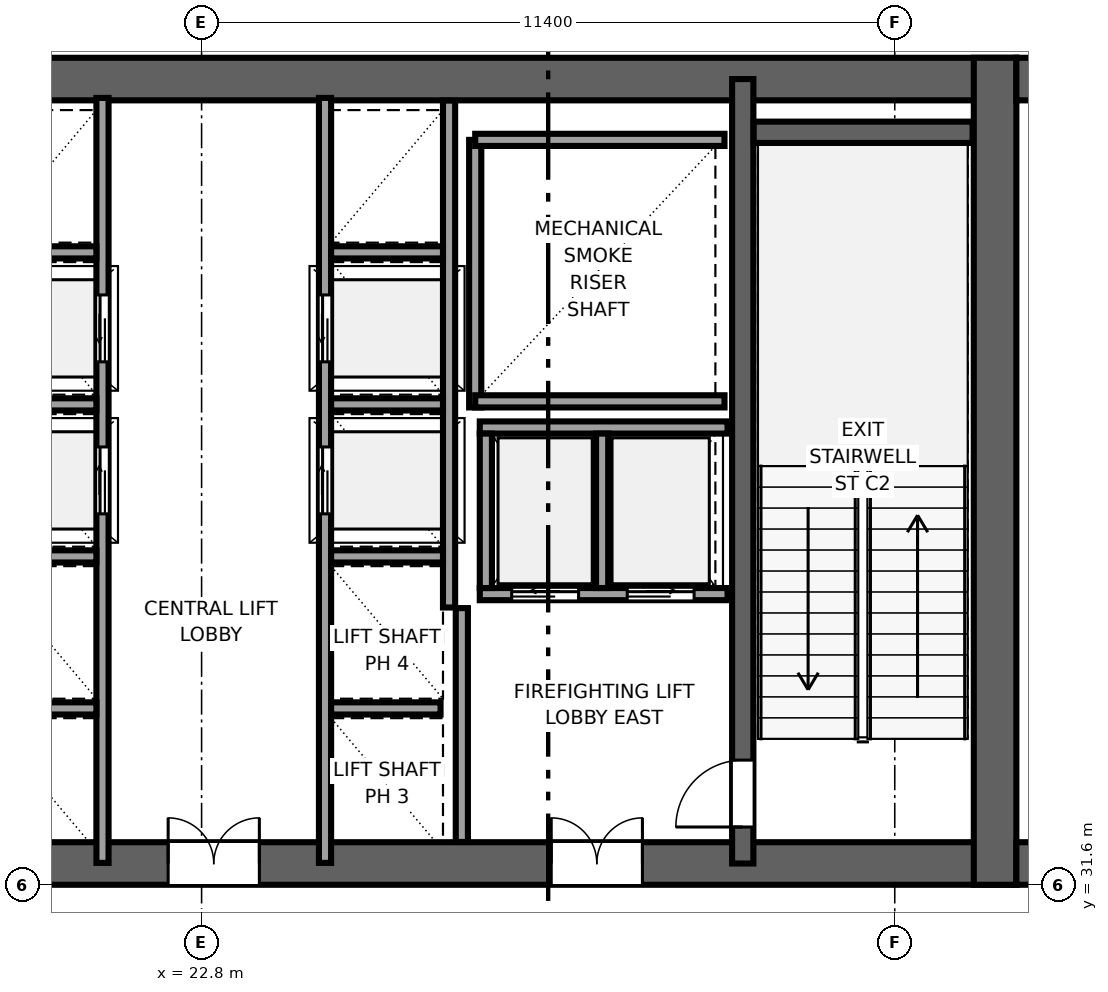
"""IFC4 building model, lengths in metres.
Left out: names, types, materials, properties, quantities, classifications, styles, units other than length and angle.
Written with IfcOpenShell. Run it as: python <this file> out.ifc"""

import sys

from ifc_helpers import new_model, si_unit, direction, frame, frame_2d, origin, place, context, subcontext, project, spatial, rectangle, extrude, source, transform, mapped, element, fill, save


model = new_model("IFC4")
c1 = context("Model", 3, precision=1e-05, world=origin(), true_north=direction((0.0, 1.0)))
c2 = subcontext(c1, "Body", "Model", "MODEL_VIEW")
j1 = project(units=[si_unit("LENGTHUNIT", "METRE"), si_unit("PLANEANGLEUNIT", "RADIAN")], contexts=[c1])
p1 = place(None, origin())
s1 = spatial("IfcSite", under=j1, at=p1, CompositionType="ELEMENT")
p2 = place(p1, origin())
s2 = spatial("IfcBuilding", under=s1, at=p2, CompositionType="ELEMENT")
p3 = place(p2, frame((0.0, 0.0, 182.55)))
s3 = spatial("IfcBuildingStorey", under=s2, at=p3, CompositionType="ELEMENT", Elevation=182.55)
p4 = place(p3, frame((9.8, 31.95, 0.0), z_axis=(0.0, 0.0, 1.0), x_axis=(1.0, 0.0, 0.0)))
e1 = element("IfcWall", 1, at=p4, inside=s3, PredefinedType="SHEAR", context=c2, shape_type="SweptSolid", body=[
    extrude(rectangle(XDim=26.4, YDim=0.7, at=frame_2d((13.2, 0.0))), origin(), (0.0, 0.0, 1.0), 5.0),
])
p5 = place(p4, frame((7.65, 0.0, 0.0), z_axis=(0.0, 0.0, 1.0), x_axis=(-1.0, 0.0, 0.0)))
e2 = element("IfcOpeningElement", 2, at=p5, cuts=e1, PredefinedType="OPENING", context=c2, shape_type="SweptSolid", body=[
    extrude(rectangle(XDim=1.5, YDim=2.04, at=frame_2d((0.75, 1.02))), frame((0.0, 0.36, 0.0), z_axis=(0.0, -1.0, 0.0), x_axis=(1.0, 0.0, 0.0)), (0.0, 0.0, 1.0), 0.72),
])
p6 = place(p4, frame((13.95, 0.0, 0.0), z_axis=(0.0, 0.0, 1.0), x_axis=(-1.0, 0.0, 0.0)))
e3 = element("IfcOpeningElement", 3, at=p6, cuts=e1, PredefinedType="OPENING", context=c2, shape_type="SweptSolid", body=[
    extrude(rectangle(XDim=1.5, YDim=2.04, at=frame_2d((0.75, 1.02))), frame((0.0, 0.36, 0.0), z_axis=(0.0, -1.0, 0.0), x_axis=(1.0, 0.0, 0.0)), (0.0, 0.0, 1.0), 0.72),
])
p7 = place(p4, frame((20.25, 0.0, 0.0), z_axis=(0.0, 0.0, 1.0), x_axis=(-1.0, 0.0, 0.0)))
e4 = element("IfcOpeningElement", 4, at=p7, cuts=e1, PredefinedType="OPENING", context=c2, shape_type="SweptSolid", body=[
    extrude(rectangle(XDim=1.5, YDim=2.04, at=frame_2d((0.75, 1.02))), frame((0.0, 0.36, 0.0), z_axis=(0.0, -1.0, 0.0), x_axis=(1.0, 0.0, 0.0)), (0.0, 0.0, 1.0), 0.72),
])
p8 = place(p3, frame((9.8, 44.85, 0.0), z_axis=(0.0, 0.0, 1.0), x_axis=(1.0, 0.0, 0.0)))
e5 = element("IfcWall", 5, at=p8, inside=s3, PredefinedType="SHEAR", context=c2, shape_type="SweptSolid", body=[
    extrude(rectangle(XDim=26.4, YDim=0.7, at=frame_2d((13.2, 0.0))), origin(), (0.0, 0.0, 1.0), 5.0),
])
p9 = place(p3, frame((35.85, 31.6, 0.0), z_axis=(0.0, 0.0, 1.0), x_axis=(0.0, 1.0, 0.0)))
e6 = element("IfcWall", 6, at=p9, inside=s3, PredefinedType="SHEAR", context=c2, shape_type="SweptSolid", body=[
    extrude(rectangle(XDim=13.6, YDim=0.7, at=frame_2d((6.8, 0.0))), origin(), (0.0, 0.0, 1.0), 5.0),
])
p10 = place(p3, frame((31.7, 31.95, 0.0), z_axis=(0.0, 0.0, 1.0), x_axis=(0.0, 1.0, 0.0)))
e7 = element("IfcWall", 7, at=p10, inside=s3, PredefinedType="SHEAR", context=c2, shape_type="SweptSolid", body=[
    extrude(rectangle(XDim=12.9, YDim=0.35, at=frame_2d((6.45, 0.0))), origin(), (0.0, 0.0, 1.0), 5.0),
])
p11 = place(p10, frame((1.7, 0.0, 0.0), z_axis=(0.0, 0.0, 1.0), x_axis=(-1.0, 0.0, 0.0)))
e8 = element("IfcOpeningElement", 8, at=p11, cuts=e7, PredefinedType="OPENING", context=c2, shape_type="SweptSolid", body=[
    extrude(rectangle(XDim=1.1, YDim=2.12, at=frame_2d((0.55, 1.06))), frame((0.0, 0.185, 0.0), z_axis=(0.0, -1.0, 0.0), x_axis=(1.0, 0.0, 0.0)), (0.0, 0.0, 1.0), 0.37),
])
for number, where, z_axis, x_axis in (
    (9, (36.2, 31.95, 0.0), (0.0, 0.0, 1.0), (1.0, 0.0, 0.0)),
    (10, (36.2, 44.85, 0.0), (0.0, 0.0, 1.0), (1.0, 0.0, 0.0)),
):
    element("IfcWall", number, at=place(p3, frame(where, z_axis=z_axis, x_axis=x_axis)), inside=s3, PredefinedType="SHEAR", context=c2, shape_type="SweptSolid", body=[
        extrude(rectangle(XDim=4.2, YDim=0.7, at=frame_2d((2.1, 0.0))), origin(), (0.0, 0.0, 1.0), 5.0),
    ])
p12 = place(p3, frame((31.88, 43.975, 0.0), z_axis=(0.0, 0.0, 1.0), x_axis=(1.0, 0.0, 0.0)))
e11 = element("IfcWall", 11, at=p12, inside=s3, PredefinedType="SHEAR", context=c2, shape_type="SweptSolid", body=[
    extrude(rectangle(XDim=3.6, YDim=0.35, at=frame_2d((1.8, 0.0))), origin(), (0.0, 0.0, 1.0), 5.0),
])
p13 = place(p3, frame((27.3, 39.45, 0.0), z_axis=(0.0, 0.0, 1.0), x_axis=(0.0, 1.0, 0.0)))
e12 = element("IfcWall", 12, at=p13, inside=s3, PredefinedType="SOLIDWALL", context=c2, shape_type="SweptSolid", body=[
    extrude(rectangle(XDim=4.4, YDim=0.2, at=frame_2d((2.2, 0.0))), origin(), (0.0, 0.0, 1.0), 4.82),
])
for number, where, z_axis, x_axis in (
    (13, (27.3, 39.55, 0.0), (0.0, 0.0, 1.0), (1.0, 0.0, 0.0)),
    (14, (27.3, 43.85, 0.0), (0.0, 0.0, 1.0), (1.0, 0.0, 0.0)),
):
    element("IfcWall", number, at=place(p3, frame(where, z_axis=z_axis, x_axis=x_axis)), inside=s3, PredefinedType="SOLIDWALL", context=c2, shape_type="SweptSolid", body=[
        extrude(rectangle(XDim=4.1, YDim=0.2, at=frame_2d((2.05, 0.0))), origin(), (0.0, 0.0, 1.0), 4.82),
    ])
p14 = place(p3, frame((27.08, 32.304, 0.0), z_axis=(0.0, 0.0, 1.0), x_axis=(0.0, 1.0, 0.0)))
e15 = element("IfcWall", 15, at=p14, inside=s3, PredefinedType="SOLIDWALL", context=c2, shape_type="SweptSolid", body=[
    extrude(rectangle(XDim=3.846, YDim=0.2, at=frame_2d((1.923, 0.0))), origin(), (0.0, 0.0, 1.0), 4.82),
])
p15 = place(p3, frame((21.17, 31.96, 0.0), z_axis=(0.0, 0.0, 1.0), x_axis=(0.0, 1.0, 0.0)))
e16 = element("IfcWall", 16, at=p15, inside=s3, PredefinedType="SOLIDWALL", context=c2, shape_type="SweptSolid", body=[
    extrude(rectangle(XDim=12.58, YDim=0.2, at=frame_2d((6.29, 0.0))), origin(), (0.0, 0.0, 1.0), 4.82),
])
p16 = place(p15, frame((5.74, 0.0, 0.0)))
e17 = element("IfcOpeningElement", 17, at=p16, cuts=e16, PredefinedType="OPENING", context=c2, shape_type="SweptSolid", body=[
    extrude(rectangle(XDim=1.1, YDim=2.12, at=frame_2d((0.55, 1.06))), frame((0.0, 0.11, 0.0), z_axis=(0.0, -1.0, 0.0), x_axis=(1.0, 0.0, 0.0)), (0.0, 0.0, 1.0), 0.22),
])
p17 = place(p15, frame((8.24, 0.0, 0.0)))
e18 = element("IfcOpeningElement", 18, at=p17, cuts=e16, PredefinedType="OPENING", context=c2, shape_type="SweptSolid", body=[
    extrude(rectangle(XDim=1.1, YDim=2.12, at=frame_2d((0.55, 1.06))), frame((0.0, 0.11, 0.0), z_axis=(0.0, -1.0, 0.0), x_axis=(1.0, 0.0, 0.0)), (0.0, 0.0, 1.0), 0.22),
])
p18 = place(p3, frame((19.27, 34.5, 0.0), z_axis=(0.0, 0.0, 1.0), x_axis=(1.0, 0.0, 0.0)))
e19 = element("IfcWall", 19, at=p18, inside=s3, PredefinedType="SOLIDWALL", context=c2, shape_type="SweptSolid", body=[
    extrude(rectangle(XDim=1.8, YDim=0.2, at=frame_2d((0.9, 0.0))), origin(), (0.0, 0.0, 1.0), 4.82),
])
for number, where, z_axis, x_axis in (
    (20, (19.23, 37.0, 0.0), (0.0, 0.0, 1.0), (1.0, 0.0, 0.0)),
    (21, (19.23, 39.5, 0.0), (0.0, 0.0, 1.0), (1.0, 0.0, 0.0)),
    (22, (19.23, 42.0, 0.0), (0.0, 0.0, 1.0), (1.0, 0.0, 0.0)),
):
    element("IfcWall", number, at=place(p3, frame(where, z_axis=z_axis, x_axis=x_axis)), inside=s3, PredefinedType="SOLIDWALL", context=c2, shape_type="SweptSolid", body=[
        extrude(rectangle(XDim=1.84, YDim=0.2, at=frame_2d((0.92, 0.0))), origin(), (0.0, 0.0, 1.0), 4.82),
    ])
p19 = place(p3, frame((27.375, 36.38, 0.0), z_axis=(0.0, 0.0, 1.0), x_axis=(1.0, 0.0, 0.0)))
e23 = element("IfcWall", 23, at=p19, inside=s3, PredefinedType="SOLIDWALL", context=c2, shape_type="SweptSolid", body=[
    extrude(rectangle(XDim=4.075, YDim=0.2, at=frame_2d((2.038, 0.0))), origin(), (0.0, 0.0, 1.0), 4.82),
])
p20 = place(p19, frame((0.525, 0.0, 0.0)))
e24 = element("IfcOpeningElement", 24, at=p20, cuts=e23, PredefinedType="OPENING", context=c2, shape_type="SweptSolid", body=[
    extrude(rectangle(XDim=1.1, YDim=2.12, at=frame_2d((0.55, 1.06))), frame((0.0, 0.11, 0.0), z_axis=(0.0, -1.0, 0.0), x_axis=(1.0, 0.0, 0.0)), (0.0, 0.0, 1.0), 0.22),
])
p21 = place(p19, frame((2.425, 0.0, 0.0)))
e25 = element("IfcOpeningElement", 25, at=p21, cuts=e23, PredefinedType="OPENING", context=c2, shape_type="SweptSolid", body=[
    extrude(rectangle(XDim=1.1, YDim=2.12, at=frame_2d((0.55, 1.06))), frame((0.0, 0.11, 0.0), z_axis=(0.0, -1.0, 0.0), x_axis=(1.0, 0.0, 0.0)), (0.0, 0.0, 1.0), 0.22),
])
p22 = place(p3, frame((27.375, 39.12, 0.0), z_axis=(0.0, 0.0, 1.0), x_axis=(1.0, 0.0, 0.0)))
e26 = element("IfcWall", 26, at=p22, inside=s3, PredefinedType="SOLIDWALL", context=c2, shape_type="SweptSolid", body=[
    extrude(rectangle(XDim=4.075, YDim=0.2, at=frame_2d((2.038, 0.0))), origin(), (0.0, 0.0, 1.0), 4.82),
])
for number, where, z_axis, x_axis in (
    (27, (27.475, 36.48, 0.0), (0.0, 0.0, 1.0), (0.0, 1.0, 0.0)),
    (28, (29.387, 36.48, 0.0), (0.0, 0.0, 1.0), (0.0, 1.0, 0.0)),
):
    element("IfcWall", number, at=place(p3, frame(where, z_axis=z_axis, x_axis=x_axis)), inside=s3, PredefinedType="SOLIDWALL", context=c2, shape_type="SweptSolid", body=[
        extrude(rectangle(XDim=2.54, YDim=0.2, at=frame_2d((1.27, 0.0))), origin(), (0.0, 0.0, 1.0), 4.82),
    ])
p23 = place(p3, frame((24.83, 31.96, 0.0), z_axis=(0.0, 0.0, 1.0), x_axis=(0.0, 1.0, 0.0)))
e29 = element("IfcWall", 29, at=p23, inside=s3, PredefinedType="SOLIDWALL", context=c2, shape_type="SweptSolid", body=[
    extrude(rectangle(XDim=12.58, YDim=0.2, at=frame_2d((6.29, 0.0))), origin(), (0.0, 0.0, 1.0), 4.82),
])
p24 = place(p23, frame((5.74, 0.0, 0.0)))
e30 = element("IfcOpeningElement", 30, at=p24, cuts=e29, PredefinedType="OPENING", context=c2, shape_type="SweptSolid", body=[
    extrude(rectangle(XDim=1.1, YDim=2.12, at=frame_2d((0.55, 1.06))), frame((0.0, 0.11, 0.0), z_axis=(0.0, -1.0, 0.0), x_axis=(1.0, 0.0, 0.0)), (0.0, 0.0, 1.0), 0.22),
])
p25 = place(p23, frame((8.24, 0.0, 0.0)))
e31 = element("IfcOpeningElement", 31, at=p25, cuts=e29, PredefinedType="OPENING", context=c2, shape_type="SweptSolid", body=[
    extrude(rectangle(XDim=1.1, YDim=2.12, at=frame_2d((0.55, 1.06))), frame((0.0, 0.11, 0.0), z_axis=(0.0, -1.0, 0.0), x_axis=(1.0, 0.0, 0.0)), (0.0, 0.0, 1.0), 0.22),
])
p26 = place(p3, frame((26.87, 36.16, 0.0), z_axis=(0.0, 0.0, 1.0), x_axis=(0.0, 1.0, 0.0)))
e32 = element("IfcWall", 32, at=p26, inside=s3, PredefinedType="SOLIDWALL", context=c2, shape_type="SweptSolid", body=[
    extrude(rectangle(XDim=8.336, YDim=0.2, at=frame_2d((4.168, 0.0))), origin(), (0.0, 0.0, 1.0), 4.82),
])
p27 = place(p3, frame((24.93, 34.5, 0.0), z_axis=(0.0, 0.0, 1.0), x_axis=(1.0, 0.0, 0.0)))
e33 = element("IfcWall", 33, at=p27, inside=s3, PredefinedType="SOLIDWALL", context=c2, shape_type="SweptSolid", body=[
    extrude(rectangle(XDim=1.8, YDim=0.2, at=frame_2d((0.9, 0.0))), origin(), (0.0, 0.0, 1.0), 4.82),
])
for number, where, z_axis, x_axis in (
    (34, (24.93, 37.0, 0.0), (0.0, 0.0, 1.0), (1.0, 0.0, 0.0)),
    (35, (24.93, 39.5, 0.0), (0.0, 0.0, 1.0), (1.0, 0.0, 0.0)),
    (36, (24.93, 42.0, 0.0), (0.0, 0.0, 1.0), (1.0, 0.0, 0.0)),
):
    element("IfcWall", number, at=place(p3, frame(where, z_axis=z_axis, x_axis=x_axis)), inside=s3, PredefinedType="SOLIDWALL", context=c2, shape_type="SweptSolid", body=[
        extrude(rectangle(XDim=1.84, YDim=0.2, at=frame_2d((0.92, 0.0))), origin(), (0.0, 0.0, 1.0), 4.82),
    ])
m1 = source(origin(), c2, "Body", "SweptSolid", [
    extrude(rectangle(XDim=1.1, YDim=2.12, at=frame_2d((0.55, 1.06))), frame((0.0, 0.025, 0.0), z_axis=(0.0, -1.0, 0.0), x_axis=(1.0, 0.0, 0.0)), (0.0, 0.0, 1.0), 0.05),
])
p28 = place(p11, origin())
e37 = element("IfcDoor", 37, at=p28, inside=s3, OperationType="SINGLE_SWING_LEFT", PredefinedType="DOOR", context=c2, shape_type="MappedRepresentation", body=[
    mapped(m1, transform((0.0, 0.0, 0.0), x_axis=(1.0, 0.0, 0.0), y_axis=(0.0, 1.0, 0.0), z_axis=(0.0, 0.0, 1.0), scale=1.0)),
])
fill(e8, e37)
m2 = source(origin(), c2, "Body", "SweptSolid", [
    extrude(rectangle(XDim=1.5, YDim=2.04, at=frame_2d((0.75, 1.02))), frame((0.0, 0.025, 0.0), z_axis=(0.0, -1.0, 0.0), x_axis=(1.0, 0.0, 0.0)), (0.0, 0.0, 1.0), 0.05),
])
p29 = place(p6, origin())
e38 = element("IfcDoor", 38, at=p29, inside=s3, OperationType="DOUBLE_DOOR_SINGLE_SWING", PredefinedType="DOOR", context=c2, shape_type="MappedRepresentation", body=[
    mapped(m2, transform((0.0, 0.0, 0.0), x_axis=(1.0, 0.0, 0.0), y_axis=(0.0, 1.0, 0.0), z_axis=(0.0, 0.0, 1.0), scale=1.0)),
])
fill(e3, e38)
p30 = place(p7, origin())
e39 = element("IfcDoor", 39, at=p30, inside=s3, OperationType="DOUBLE_DOOR_SINGLE_SWING", PredefinedType="DOOR", context=c2, shape_type="MappedRepresentation", body=[
    mapped(m2, transform((0.0, 0.0, 0.0), x_axis=(1.0, 0.0, 0.0), y_axis=(0.0, 1.0, 0.0), z_axis=(0.0, 0.0, 1.0), scale=1.0)),
])
fill(e4, e39)
m3 = source(origin(), c2, "Body", "SweptSolid", [
    extrude(rectangle(XDim=1.1, YDim=2.12, at=frame_2d((0.55, 1.06))), frame((0.0, 0.025, 0.0), z_axis=(0.0, -1.0, 0.0), x_axis=(1.0, 0.0, 0.0)), (0.0, 0.0, 1.0), 0.05),
])
p31 = place(p16, origin())
e40 = element("IfcDoor", 40, at=p31, inside=s3, OperationType="SLIDING_TO_RIGHT", PredefinedType="DOOR", context=c2, shape_type="MappedRepresentation", body=[
    mapped(m3, transform((0.0, 0.0, 0.0), x_axis=(1.0, 0.0, 0.0), y_axis=(0.0, 1.0, 0.0), z_axis=(0.0, 0.0, 1.0), scale=1.0)),
])
fill(e17, e40)
p32 = place(p17, origin())
e41 = element("IfcDoor", 41, at=p32, inside=s3, OperationType="SLIDING_TO_LEFT", PredefinedType="DOOR", context=c2, shape_type="MappedRepresentation", body=[
    mapped(m3, transform((0.0, 0.0, 0.0), x_axis=(1.0, 0.0, 0.0), y_axis=(0.0, 1.0, 0.0), z_axis=(0.0, 0.0, 1.0), scale=1.0)),
])
fill(e18, e41)
p33 = place(p20, origin())
e42 = element("IfcDoor", 42, at=p33, inside=s3, OperationType="SLIDING_TO_LEFT", PredefinedType="DOOR", context=c2, shape_type="MappedRepresentation", body=[
    mapped(m3, transform((0.0, 0.0, 0.0), x_axis=(1.0, 0.0, 0.0), y_axis=(0.0, 1.0, 0.0), z_axis=(0.0, 0.0, 1.0), scale=1.0)),
])
fill(e24, e42)
p34 = place(p21, origin())
e43 = element("IfcDoor", 43, at=p34, inside=s3, OperationType="SLIDING_TO_RIGHT", PredefinedType="DOOR", context=c2, shape_type="MappedRepresentation", body=[
    mapped(m3, transform((0.0, 0.0, 0.0), x_axis=(1.0, 0.0, 0.0), y_axis=(0.0, 1.0, 0.0), z_axis=(0.0, 0.0, 1.0), scale=1.0)),
])
fill(e25, e43)
p35 = place(p24, origin())
e44 = element("IfcDoor", 44, at=p35, inside=s3, OperationType="SLIDING_TO_RIGHT", PredefinedType="DOOR", context=c2, shape_type="MappedRepresentation", body=[
    mapped(m3, transform((0.0, 0.0, 0.0), x_axis=(1.0, 0.0, 0.0), y_axis=(0.0, 1.0, 0.0), z_axis=(0.0, 0.0, 1.0), scale=1.0)),
])
fill(e30, e44)
p36 = place(p25, origin())
e45 = element("IfcDoor", 45, at=p36, inside=s3, OperationType="SLIDING_TO_LEFT", PredefinedType="DOOR", context=c2, shape_type="MappedRepresentation", body=[
    mapped(m3, transform((0.0, 0.0, 0.0), x_axis=(1.0, 0.0, 0.0), y_axis=(0.0, 1.0, 0.0), z_axis=(0.0, 0.0, 1.0), scale=1.0)),
])
fill(e31, e45)
save(model, sys.argv[1])
